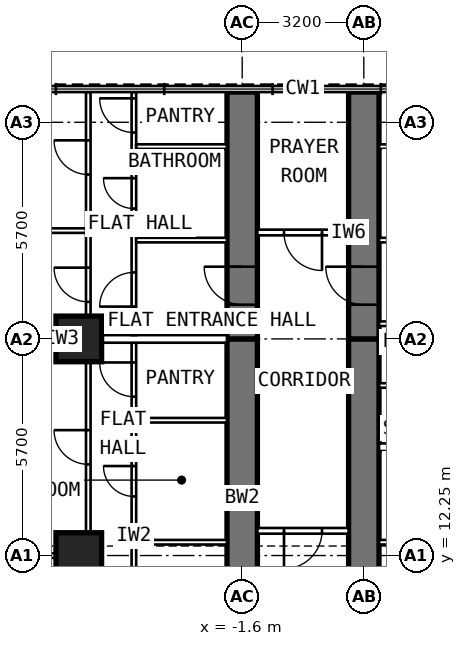
"""IFC4 building model, lengths in metres.
Left out: names, types, materials, properties, quantities, classifications, styles, units other than length and angle.
Written with IfcOpenShell. Run it as: python <this file> out.ifc"""

import sys

from ifc_helpers import new_model, si_unit, direction, frame, frame_2d, origin, origin_2d, place, context, subcontext, project, spatial, rectangle, extrude, element, fill, save


model = new_model("IFC4")
c1 = context("Model", 3, precision=1e-05, world=origin(), true_north=direction((0.0, 1.0)))
c2 = subcontext(c1, "Body", "Model", "MODEL_VIEW")
j1 = project(units=[si_unit("LENGTHUNIT", "METRE"), si_unit("PLANEANGLEUNIT", "RADIAN")], contexts=[c1])
p1 = place(None, origin())
s1 = spatial("IfcSite", under=j1, at=p1, CompositionType="ELEMENT")
p2 = place(p1, origin())
s2 = spatial("IfcBuilding", under=s1, at=p2, CompositionType="ELEMENT")
p3 = place(p2, frame((0.0, 0.0, 127.4)))
s3 = spatial("IfcBuildingStorey", under=s2, at=p3, CompositionType="ELEMENT", Elevation=127.4)
for number, where, z_axis, x_axis in (
    (1, (-5.9, 12.25, 0.0), (0.0, 0.0, 1.0), (0.0, 1.0, 0.0)),
    (2, (-5.9, 17.95, 0.0), (0.0, 0.0, 1.0), (0.0, 1.0, 0.0)),
):
    element("IfcColumn", number, at=place(p3, frame(where, z_axis=z_axis, x_axis=x_axis)), inside=s3, PredefinedType="COLUMN", context=c2, shape_type="SweptSolid", body=[
        extrude(rectangle(XDim=1.2, YDim=1.2, at=origin_2d()), origin(), (0.0, 0.0, 1.0), 3.6),
    ])
p4 = place(p3, frame((-1.6, 9.6, 0.0), z_axis=(0.0, 0.0, 1.0), x_axis=(0.0, 1.0, 0.0)))
e3 = element("IfcWall", 3, at=p4, inside=s3, PredefinedType="SHEAR", context=c2, shape_type="SweptSolid", body=[
    extrude(rectangle(XDim=8.35, YDim=0.8, at=frame_2d((4.175, 0.0))), origin(), (0.0, 0.0, 1.0), 3.6),
])
p5 = place(p4, frame((1.3, 0.0, 0.0)))
e4 = element("IfcOpeningElement", 4, at=p5, cuts=e3, PredefinedType="OPENING", context=c2, shape_type="SweptSolid", body=[
    extrude(rectangle(XDim=1.0, YDim=2.1, at=frame_2d((0.5, 1.05))), frame((0.0, 0.412, 0.0), z_axis=(0.0, -1.0, 0.0), x_axis=(1.0, 0.0, 0.0)), (0.0, 0.0, 1.0), 0.824),
])
p6 = place(p3, frame((-1.6, 17.95, 0.0), z_axis=(0.0, 0.0, 1.0), x_axis=(0.0, 1.0, 0.0)))
e5 = element("IfcWall", 5, at=p6, inside=s3, PredefinedType="SHEAR", context=c2, shape_type="SweptSolid", body=[
    extrude(rectangle(XDim=6.495, YDim=0.8, at=frame_2d((3.248, 0.0))), origin(), (0.0, 0.0, 1.0), 3.6),
])
p7 = place(p6, frame((0.9, 0.0, 0.0)))
e6 = element("IfcOpeningElement", 6, at=p7, cuts=e5, PredefinedType="OPENING", context=c2, shape_type="SweptSolid", body=[
    extrude(rectangle(XDim=1.0, YDim=2.1, at=frame_2d((0.5, 1.05))), frame((0.0, 0.412, 0.0), z_axis=(0.0, -1.0, 0.0), x_axis=(1.0, 0.0, 0.0)), (0.0, 0.0, 1.0), 0.824),
])
p8 = place(p3, frame((1.6, 9.6, 0.0), z_axis=(0.0, 0.0, 1.0), x_axis=(0.0, 1.0, 0.0)))
e7 = element("IfcWall", 7, at=p8, inside=s3, PredefinedType="SHEAR", context=c2, shape_type="SweptSolid", body=[
    extrude(rectangle(XDim=8.35, YDim=0.8, at=frame_2d((4.175, 0.0))), origin(), (0.0, 0.0, 1.0), 3.6),
])
p9 = place(p8, frame((1.3, 0.0, 0.0)))
e8 = element("IfcOpeningElement", 8, at=p9, cuts=e7, PredefinedType="OPENING", context=c2, shape_type="SweptSolid", body=[
    extrude(rectangle(XDim=1.0, YDim=2.1, at=frame_2d((0.5, 1.05))), frame((0.0, 0.412, 0.0), z_axis=(0.0, -1.0, 0.0), x_axis=(1.0, 0.0, 0.0)), (0.0, 0.0, 1.0), 0.824),
])
p10 = place(p3, frame((1.6, 17.95, 0.0), z_axis=(0.0, 0.0, 1.0), x_axis=(0.0, 1.0, 0.0)))
e9 = element("IfcWall", 9, at=p10, inside=s3, PredefinedType="SHEAR", context=c2, shape_type="SweptSolid", body=[
    extrude(rectangle(XDim=6.495, YDim=0.8, at=frame_2d((3.248, 0.0))), origin(), (0.0, 0.0, 1.0), 3.6),
])
p11 = place(p10, frame((0.9, 0.0, 0.0)))
e10 = element("IfcOpeningElement", 10, at=p11, cuts=e9, PredefinedType="OPENING", context=c2, shape_type="SweptSolid", body=[
    extrude(rectangle(XDim=1.0, YDim=2.1, at=frame_2d((0.5, 1.05))), frame((0.0, 0.412, 0.0), z_axis=(0.0, -1.0, 0.0), x_axis=(1.0, 0.0, 0.0)), (0.0, 0.0, 1.0), 0.824),
])
p12 = place(p3, frame((-4.45, 10.05, 0.0), z_axis=(0.0, 0.0, 1.0), x_axis=(0.0, 1.0, 0.0)))
e11 = element("IfcWall", 11, at=p12, inside=s3, PredefinedType="PARTITIONING", context=c2, shape_type="SweptSolid", body=[
    extrude(rectangle(XDim=7.8, YDim=0.12, at=frame_2d((3.9, 0.0))), origin(), (0.0, 0.0, 1.0), 3.35),
])
p13 = place(p12, frame((0.8, 0.0, 0.0)))
e12 = element("IfcOpeningElement", 12, at=p13, cuts=e11, PredefinedType="OPENING", context=c2, shape_type="SweptSolid", body=[
    extrude(rectangle(XDim=0.9, YDim=2.1, at=frame_2d((0.45, 1.05))), frame((0.0, 0.072, 0.0), z_axis=(0.0, -1.0, 0.0), x_axis=(1.0, 0.0, 0.0)), (0.0, 0.0, 1.0), 0.144),
])
p14 = place(p12, frame((3.755, 0.0, 0.0)))
e13 = element("IfcOpeningElement", 13, at=p14, cuts=e11, PredefinedType="OPENING", context=c2, shape_type="SweptSolid", body=[
    extrude(rectangle(XDim=0.8, YDim=2.1, at=frame_2d((0.4, 1.05))), frame((0.0, 0.072, 0.0), z_axis=(0.0, -1.0, 0.0), x_axis=(1.0, 0.0, 0.0)), (0.0, 0.0, 1.0), 0.144),
])
p15 = place(p12, frame((6.38, 0.0, 0.0)))
e14 = element("IfcOpeningElement", 14, at=p15, cuts=e11, PredefinedType="OPENING", context=c2, shape_type="SweptSolid", body=[
    extrude(rectangle(XDim=0.9, YDim=2.1, at=frame_2d((0.45, 1.05))), frame((0.0, 0.072, 0.0), z_axis=(0.0, -1.0, 0.0), x_axis=(1.0, 0.0, 0.0)), (0.0, 0.0, 1.0), 0.144),
])
p16 = place(p3, frame((-5.65, 9.6, 0.0), z_axis=(0.0, 0.0, 1.0), x_axis=(0.0, 1.0, 0.0)))
e15 = element("IfcWall", 15, at=p16, inside=s3, PredefinedType="PARTITIONING", context=c2, shape_type="SweptSolid", body=[
    extrude(rectangle(XDim=8.1, YDim=0.12, at=frame_2d((4.05, 0.0))), origin(), (0.0, 0.0, 1.0), 3.35),
])
p17 = place(p16, frame((5.05, 0.0, 0.0)))
e16 = element("IfcOpeningElement", 16, at=p17, cuts=e15, PredefinedType="OPENING", context=c2, shape_type="SweptSolid", body=[
    extrude(rectangle(XDim=0.9, YDim=2.1, at=frame_2d((0.45, 1.05))), frame((0.0, 0.072, 0.0), z_axis=(0.0, -1.0, 0.0), x_axis=(1.0, 0.0, 0.0)), (0.0, 0.0, 1.0), 0.144),
])
p18 = place(p3, frame((-5.71, 12.25, 0.0), z_axis=(0.0, 0.0, 1.0), x_axis=(-1.0, 0.0, 0.0)))
e17 = element("IfcWall", 17, at=p18, inside=s3, PredefinedType="PARTITIONING", context=c2, shape_type="SweptSolid", body=[
    extrude(rectangle(XDim=4.99, YDim=0.12, at=frame_2d((2.495, 0.0))), origin(), (0.0, 0.0, 1.0), 2.45),
])
p19 = place(p18, frame((1.94, 0.0, 0.0)))
e18 = element("IfcOpeningElement", 18, at=p19, cuts=e17, PredefinedType="OPENING", context=c2, shape_type="SweptSolid", body=[
    extrude(rectangle(XDim=0.9, YDim=2.1, at=frame_2d((0.45, 1.05))), frame((0.0, 0.072, 0.0), z_axis=(0.0, -1.0, 0.0), x_axis=(1.0, 0.0, 0.0)), (0.0, 0.0, 1.0), 0.144),
])
p20 = place(p3, frame((-2.0, 12.6, 0.0), z_axis=(0.0, 0.0, 1.0), x_axis=(-1.0, 0.0, 0.0)))
e19 = element("IfcWall", 19, at=p20, inside=s3, PredefinedType="PARTITIONING", context=c2, shape_type="SweptSolid", body=[
    extrude(rectangle(XDim=2.39, YDim=0.12, at=frame_2d((1.195, 0.0))), origin(), (0.0, 0.0, 1.0), 2.45),
])
p21 = place(p3, frame((-2.0, 15.81, 0.0), z_axis=(0.0, 0.0, 1.0), x_axis=(-1.0, 0.0, 0.0)))
e20 = element("IfcWall", 20, at=p21, inside=s3, PredefinedType="PARTITIONING", context=c2, shape_type="SweptSolid", body=[
    extrude(rectangle(XDim=2.39, YDim=0.12, at=frame_2d((1.195, 0.0))), origin(), (0.0, 0.0, 1.0), 3.35),
])
p22 = place(p3, frame((-4.45, 18.05, 0.0), z_axis=(0.0, 0.0, 1.0), x_axis=(0.0, 1.0, 0.0)))
e21 = element("IfcWall", 21, at=p22, inside=s3, PredefinedType="PARTITIONING", context=c2, shape_type="SweptSolid", body=[
    extrude(rectangle(XDim=6.395, YDim=0.12, at=frame_2d((3.198, 0.0))), origin(), (0.0, 0.0, 1.0), 3.35),
])
p23 = place(p22, frame((0.75, 0.0, 0.0)))
e22 = element("IfcOpeningElement", 22, at=p23, cuts=e21, PredefinedType="OPENING", context=c2, shape_type="SweptSolid", body=[
    extrude(rectangle(XDim=0.9, YDim=2.1, at=frame_2d((0.45, 1.05))), frame((0.0, 0.072, 0.0), z_axis=(0.0, -1.0, 0.0), x_axis=(1.0, 0.0, 0.0)), (0.0, 0.0, 1.0), 0.144),
])
p24 = place(p22, frame((3.33, 0.0, 0.0)))
e23 = element("IfcOpeningElement", 23, at=p24, cuts=e21, PredefinedType="OPENING", context=c2, shape_type="SweptSolid", body=[
    extrude(rectangle(XDim=0.8, YDim=2.1, at=frame_2d((0.4, 1.05))), frame((0.0, 0.072, 0.0), z_axis=(0.0, -1.0, 0.0), x_axis=(1.0, 0.0, 0.0)), (0.0, 0.0, 1.0), 0.144),
])
p25 = place(p22, frame((5.33, 0.0, 0.0)))
e24 = element("IfcOpeningElement", 24, at=p25, cuts=e21, PredefinedType="OPENING", context=c2, shape_type="SweptSolid", body=[
    extrude(rectangle(XDim=0.9, YDim=2.1, at=frame_2d((0.45, 1.05))), frame((0.0, 0.072, 0.0), z_axis=(0.0, -1.0, 0.0), x_axis=(1.0, 0.0, 0.0)), (0.0, 0.0, 1.0), 0.144),
])
p26 = place(p3, frame((-5.65, 18.05, 0.0), z_axis=(0.0, 0.0, 1.0), x_axis=(0.0, 1.0, 0.0)))
e25 = element("IfcWall", 25, at=p26, inside=s3, PredefinedType="PARTITIONING", context=c2, shape_type="SweptSolid", body=[
    extrude(rectangle(XDim=6.395, YDim=0.12, at=frame_2d((3.198, 0.0))), origin(), (0.0, 0.0, 1.0), 3.35),
])
p27 = place(p26, frame((0.875, 0.0, 0.0)))
e26 = element("IfcOpeningElement", 26, at=p27, cuts=e25, PredefinedType="OPENING", context=c2, shape_type="SweptSolid", body=[
    extrude(rectangle(XDim=0.9, YDim=2.1, at=frame_2d((0.45, 1.05))), frame((0.0, 0.072, 0.0), z_axis=(0.0, -1.0, 0.0), x_axis=(1.0, 0.0, 0.0)), (0.0, 0.0, 1.0), 0.144),
])
p28 = place(p26, frame((4.225, 0.0, 0.0)))
e27 = element("IfcOpeningElement", 27, at=p28, cuts=e25, PredefinedType="OPENING", context=c2, shape_type="SweptSolid", body=[
    extrude(rectangle(XDim=0.9, YDim=2.1, at=frame_2d((0.45, 1.05))), frame((0.0, 0.072, 0.0), z_axis=(0.0, -1.0, 0.0), x_axis=(1.0, 0.0, 0.0)), (0.0, 0.0, 1.0), 0.144),
])
p29 = place(p3, frame((-5.71, 20.8, 0.0), z_axis=(0.0, 0.0, 1.0), x_axis=(-1.0, 0.0, 0.0)))
e28 = element("IfcWall", 28, at=p29, inside=s3, PredefinedType="PARTITIONING", context=c2, shape_type="SweptSolid", body=[
    extrude(rectangle(XDim=4.99, YDim=0.12, at=frame_2d((2.495, 0.0))), origin(), (0.0, 0.0, 1.0), 3.35),
])
for number, where, z_axis, x_axis in (
    (29, (-2.0, 20.55, 0.0), (0.0, 0.0, 1.0), (-1.0, 0.0, 0.0)),
    (30, (-2.0, 23.01, 0.0), (0.0, 0.0, 1.0), (-1.0, 0.0, 0.0)),
):
    element("IfcWall", number, at=place(p3, frame(where, z_axis=z_axis, x_axis=x_axis)), inside=s3, PredefinedType="PARTITIONING", context=c2, shape_type="SweptSolid", body=[
        extrude(rectangle(XDim=2.39, YDim=0.12, at=frame_2d((1.195, 0.0))), origin(), (0.0, 0.0, 1.0), 3.35),
    ])
p30 = place(p3, frame((-2.0, 17.95, 0.0), z_axis=(0.0, 0.0, 1.0), x_axis=(-1.0, 0.0, 0.0)))
e31 = element("IfcWall", 31, at=p30, inside=s3, PredefinedType="PARTITIONING", context=c2, shape_type="SweptSolid", body=[
    extrude(rectangle(XDim=8.7, YDim=0.2, at=frame_2d((4.35, 0.0))), origin(), (0.0, 0.0, 1.0), 2.45),
])
p31 = place(p3, frame((2.0, 12.6, 0.0), z_axis=(0.0, 0.0, 1.0), x_axis=(1.0, 0.0, 0.0)))
e32 = element("IfcWall", 32, at=p31, inside=s3, PredefinedType="PARTITIONING", context=c2, shape_type="SweptSolid", body=[
    extrude(rectangle(XDim=2.39, YDim=0.12, at=frame_2d((1.195, 0.0))), origin(), (0.0, 0.0, 1.0), 2.45),
])
for number, where, z_axis, x_axis in (
    (33, (2.0, 16.725, 0.0), (0.0, 0.0, 1.0), (1.0, 0.0, 0.0)),
    (34, (2.0, 18.35, 0.0), (0.0, 0.0, 1.0), (1.0, 0.0, 0.0)),
    (35, (2.0, 20.55, 0.0), (0.0, 0.0, 1.0), (1.0, 0.0, 0.0)),
    (36, (2.0, 23.01, 0.0), (0.0, 0.0, 1.0), (1.0, 0.0, 0.0)),
):
    element("IfcWall", number, at=place(p3, frame(where, z_axis=z_axis, x_axis=x_axis)), inside=s3, PredefinedType="PARTITIONING", context=c2, shape_type="SweptSolid", body=[
        extrude(rectangle(XDim=2.39, YDim=0.12, at=frame_2d((1.195, 0.0))), origin(), (0.0, 0.0, 1.0), 3.35),
    ])
p32 = place(p3, frame((2.0, 15.1, 0.0), z_axis=(0.0, 0.0, 1.0), x_axis=(1.0, 0.0, 0.0)))
e37 = element("IfcWall", 37, at=p32, inside=s3, PredefinedType="PARTITIONING", context=c2, shape_type="SweptSolid", body=[
    extrude(rectangle(XDim=8.7, YDim=0.2, at=frame_2d((4.35, 0.0))), origin(), (0.0, 0.0, 1.0), 3.35),
])
p33 = place(p3, frame((1.2, 20.75, 0.0), z_axis=(0.0, 0.0, 1.0), x_axis=(-1.0, 0.0, 0.0)))
e38 = element("IfcWall", 38, at=p33, inside=s3, PredefinedType="PARTITIONING", context=c2, shape_type="SweptSolid", body=[
    extrude(rectangle(XDim=2.4, YDim=0.15, at=frame_2d((1.2, 0.0))), origin(), (0.0, 0.0, 1.0), 3.35),
])
p34 = place(p33, frame((0.7, 0.0, 0.0)))
e39 = element("IfcOpeningElement", 39, at=p34, cuts=e38, PredefinedType="OPENING", context=c2, shape_type="SweptSolid", body=[
    extrude(rectangle(XDim=1.0, YDim=2.1, at=frame_2d((0.5, 1.05))), frame((0.0, 0.087, 0.0), z_axis=(0.0, -1.0, 0.0), x_axis=(1.0, 0.0, 0.0)), (0.0, 0.0, 1.0), 0.174),
])
p35 = place(p3, frame((1.2, 12.9, 0.0), z_axis=(0.0, 0.0, 1.0), x_axis=(-1.0, 0.0, 0.0)))
e40 = element("IfcWall", 40, at=p35, inside=s3, PredefinedType="PARTITIONING", context=c2, shape_type="SweptSolid", body=[
    extrude(rectangle(XDim=2.4, YDim=0.15, at=frame_2d((1.2, 0.0))), origin(), (0.0, 0.0, 1.0), 3.35),
])
p36 = place(p35, frame((0.7, 0.0, 0.0)))
e41 = element("IfcOpeningElement", 41, at=p36, cuts=e40, PredefinedType="OPENING", context=c2, shape_type="SweptSolid", body=[
    extrude(rectangle(XDim=1.0, YDim=2.1, at=frame_2d((0.5, 1.05))), frame((0.0, 0.087, 0.0), z_axis=(0.0, -1.0, 0.0), x_axis=(1.0, 0.0, 0.0)), (0.0, 0.0, 1.0), 0.174),
])
p37 = place(p17, origin())
e42 = element("IfcDoor", 42, at=p37, inside=s3, OperationType="SINGLE_SWING_RIGHT", PredefinedType="DOOR", context=c2, shape_type="SweptSolid", body=[
    extrude(rectangle(XDim=0.9, YDim=2.1, at=frame_2d((0.45, 1.05))), frame((0.0, 0.025, 0.0), z_axis=(0.0, -1.0, 0.0), x_axis=(1.0, 0.0, 0.0)), (0.0, 0.0, 1.0), 0.05),
])
fill(e16, e42)
p38 = place(p14, origin())
e43 = element("IfcDoor", 43, at=p38, inside=s3, OperationType="SINGLE_SWING_RIGHT", PredefinedType="DOOR", context=c2, shape_type="SweptSolid", body=[
    extrude(rectangle(XDim=0.8, YDim=2.1, at=frame_2d((0.4, 1.05))), frame((0.0, 0.025, 0.0), z_axis=(0.0, -1.0, 0.0), x_axis=(1.0, 0.0, 0.0)), (0.0, 0.0, 1.0), 0.05),
])
fill(e13, e43)
p39 = place(p15, origin())
e44 = element("IfcDoor", 44, at=p39, inside=s3, OperationType="SINGLE_SWING_RIGHT", PredefinedType="DOOR", context=c2, shape_type="SweptSolid", body=[
    extrude(rectangle(XDim=0.9, YDim=2.1, at=frame_2d((0.45, 1.05))), frame((0.0, 0.025, 0.0), z_axis=(0.0, -1.0, 0.0), x_axis=(1.0, 0.0, 0.0)), (0.0, 0.0, 1.0), 0.05),
])
fill(e14, e44)
p40 = place(p7, origin())
e45 = element("IfcDoor", 45, at=p40, inside=s3, OperationType="SINGLE_SWING_RIGHT", PredefinedType="DOOR", context=c2, shape_type="SweptSolid", body=[
    extrude(rectangle(XDim=1.0, YDim=2.1, at=frame_2d((0.5, 1.05))), frame((0.0, 0.15, 0.0), z_axis=(0.0, -1.0, 0.0), x_axis=(1.0, 0.0, 0.0)), (0.0, 0.0, 1.0), 0.3),
])
fill(e6, e45)
p41 = place(p27, origin())
e46 = element("IfcDoor", 46, at=p41, inside=s3, OperationType="SINGLE_SWING_RIGHT", PredefinedType="DOOR", context=c2, shape_type="SweptSolid", body=[
    extrude(rectangle(XDim=0.9, YDim=2.1, at=frame_2d((0.45, 1.05))), frame((0.0, 0.025, 0.0), z_axis=(0.0, -1.0, 0.0), x_axis=(1.0, 0.0, 0.0)), (0.0, 0.0, 1.0), 0.05),
])
fill(e26, e46)
p42 = place(p28, origin())
e47 = element("IfcDoor", 47, at=p42, inside=s3, OperationType="SINGLE_SWING_RIGHT", PredefinedType="DOOR", context=c2, shape_type="SweptSolid", body=[
    extrude(rectangle(XDim=0.9, YDim=2.1, at=frame_2d((0.45, 1.05))), frame((0.0, 0.025, 0.0), z_axis=(0.0, -1.0, 0.0), x_axis=(1.0, 0.0, 0.0)), (0.0, 0.0, 1.0), 0.05),
])
fill(e27, e47)
p43 = place(p23, origin())
e48 = element("IfcDoor", 48, at=p43, inside=s3, OperationType="SINGLE_SWING_LEFT", PredefinedType="DOOR", context=c2, shape_type="SweptSolid", body=[
    extrude(rectangle(XDim=0.9, YDim=2.1, at=frame_2d((0.45, 1.05))), frame((0.0, 0.025, 0.0), z_axis=(0.0, -1.0, 0.0), x_axis=(1.0, 0.0, 0.0)), (0.0, 0.0, 1.0), 0.05),
])
fill(e22, e48)
p44 = place(p24, origin())
e49 = element("IfcDoor", 49, at=p44, inside=s3, OperationType="SINGLE_SWING_RIGHT", PredefinedType="DOOR", context=c2, shape_type="SweptSolid", body=[
    extrude(rectangle(XDim=0.8, YDim=2.1, at=frame_2d((0.4, 1.05))), frame((0.0, 0.025, 0.0), z_axis=(0.0, -1.0, 0.0), x_axis=(1.0, 0.0, 0.0)), (0.0, 0.0, 1.0), 0.05),
])
fill(e23, e49)
p45 = place(p25, origin())
e50 = element("IfcDoor", 50, at=p45, inside=s3, OperationType="SINGLE_SWING_RIGHT", PredefinedType="DOOR", context=c2, shape_type="SweptSolid", body=[
    extrude(rectangle(XDim=0.9, YDim=2.1, at=frame_2d((0.45, 1.05))), frame((0.0, 0.025, 0.0), z_axis=(0.0, -1.0, 0.0), x_axis=(1.0, 0.0, 0.0)), (0.0, 0.0, 1.0), 0.05),
])
fill(e24, e50)
p46 = place(p11, origin())
e51 = element("IfcDoor", 51, at=p46, inside=s3, OperationType="SINGLE_SWING_RIGHT", PredefinedType="DOOR", context=c2, shape_type="SweptSolid", body=[
    extrude(rectangle(XDim=1.0, YDim=2.1, at=frame_2d((0.5, 1.05))), frame((0.0, 0.15, 0.0), z_axis=(0.0, -1.0, 0.0), x_axis=(1.0, 0.0, 0.0)), (0.0, 0.0, 1.0), 0.3),
])
fill(e10, e51)
p47 = place(p34, origin())
e52 = element("IfcDoor", 52, at=p47, inside=s3, OperationType="SINGLE_SWING_LEFT", PredefinedType="DOOR", context=c2, shape_type="SweptSolid", body=[
    extrude(rectangle(XDim=1.0, YDim=2.1, at=frame_2d((0.5, 1.05))), frame((0.0, 0.025, 0.0), z_axis=(0.0, -1.0, 0.0), x_axis=(1.0, 0.0, 0.0)), (0.0, 0.0, 1.0), 0.05),
])
fill(e39, e52)
p48 = place(p36, origin())
e53 = element("IfcDoor", 53, at=p48, inside=s3, OperationType="SINGLE_SWING_RIGHT", PredefinedType="DOOR", context=c2, shape_type="SweptSolid", body=[
    extrude(rectangle(XDim=1.0, YDim=2.1, at=frame_2d((0.5, 1.05))), frame((0.0, 0.025, 0.0), z_axis=(0.0, -1.0, 0.0), x_axis=(1.0, 0.0, 0.0)), (0.0, 0.0, 1.0), 0.05),
])
fill(e41, e53)
save(model, sys.argv[1])
